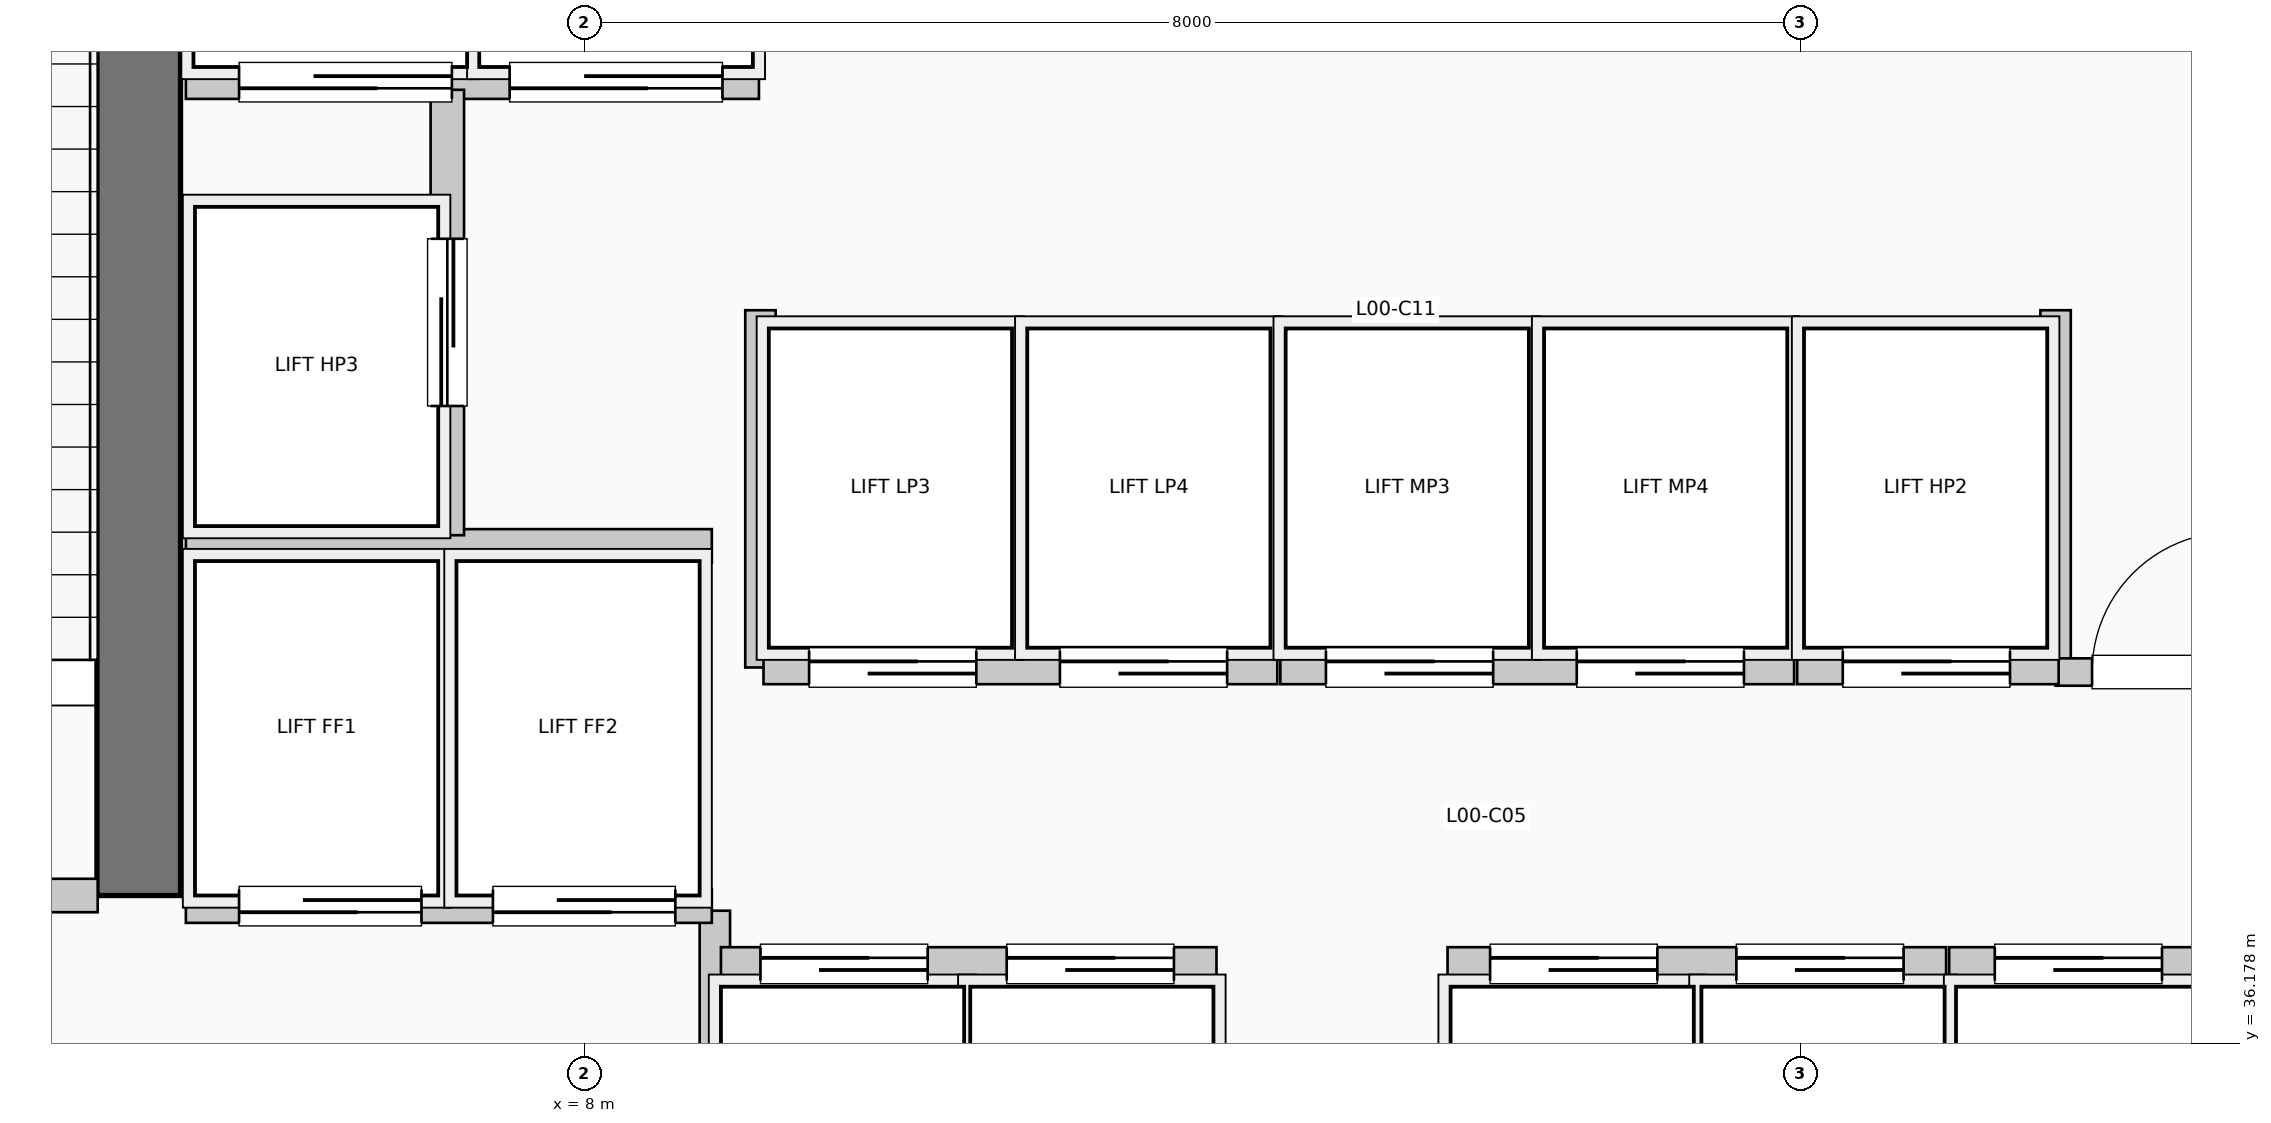
"""IFC4 building model, lengths in metres.
Left out: names, types, materials, properties, quantities, classifications, styles, units other than length and angle.
Written with IfcOpenShell. Run it as: python <this file> out.ifc"""

import sys

from ifc_helpers import new_model, si_unit, direction, frame, frame_2d, origin, place, context, subcontext, project, spatial, rectangle, extrude, element, fill, save


model = new_model("IFC4")
c1 = context("Model", 3, precision=1e-05, world=origin(), true_north=direction((0.0, 1.0)))
c2 = subcontext(c1, "Body", "Model", "MODEL_VIEW")
j1 = project(units=[si_unit("LENGTHUNIT", "METRE"), si_unit("PLANEANGLEUNIT", "RADIAN")], contexts=[c1])
p1 = place(None, origin())
s1 = spatial("IfcSite", under=j1, at=p1, CompositionType="ELEMENT")
p2 = place(p1, origin())
s2 = spatial("IfcBuilding", under=s1, at=p2, CompositionType="ELEMENT")
p3 = place(p2, origin())
s3 = spatial("IfcBuildingStorey", under=s2, at=p3, CompositionType="ELEMENT", Elevation=0.0)
p4 = place(p3, frame((5.07, 37.15, 0.0), z_axis=(0.0, 0.0, 1.0), x_axis=(0.0, 1.0, 0.0)))
e1 = element("IfcWall", 1, at=p4, inside=s3, PredefinedType="SHEAR", context=c2, shape_type="SweptSolid", body=[
    extrude(rectangle(XDim=7.89, YDim=0.55, at=frame_2d((3.945, 0.0))), origin(), (0.0, 0.0, 1.0), 5.94),
])
p5 = place(p3, frame((1.65, 37.15, 0.0), z_axis=(0.0, 0.0, 1.0), x_axis=(1.0, 0.0, 0.0)))
e2 = element("IfcWall", 2, at=p5, inside=s3, PredefinedType="PARTITIONING", context=c2, shape_type="SweptSolid", body=[
    extrude(rectangle(XDim=3.15, YDim=0.22, at=frame_2d((1.575, 0.0))), origin(), (0.0, 0.0, 1.0), 5.62),
])
p6 = place(p5, frame((2.05, 0.0, 0.0), z_axis=(0.0, 0.0, 1.0), x_axis=(-1.0, 0.0, 0.0)))
e3 = element("IfcOpeningElement", 3, at=p6, cuts=e2, PredefinedType="OPENING", context=c2, shape_type="SweptSolid", body=[
    extrude(rectangle(XDim=1.05, YDim=2.15, at=frame_2d((0.525, 1.075))), frame((0.0, 0.12, 0.0), z_axis=(0.0, -1.0, 0.0), x_axis=(1.0, 0.0, 0.0)), (0.0, 0.0, 1.0), 0.24),
])
p7 = place(p3, frame((8.86, 34.55, 0.0), z_axis=(0.0, 0.0, 1.0), x_axis=(0.0, 1.0, 0.0)))
e4 = element("IfcWall", 4, at=p7, inside=s3, PredefinedType="PARTITIONING", context=c2, shape_type="SweptSolid", body=[
    extrude(rectangle(XDim=2.5, YDim=0.2, at=frame_2d((1.25, 0.0))), origin(), (0.0, 0.0, 1.0), 5.62),
])
p8 = place(p3, frame((5.38, 37.08, 0.0), z_axis=(0.0, 0.0, 1.0), x_axis=(1.0, 0.0, 0.0)))
e5 = element("IfcWall", 5, at=p8, inside=s3, PredefinedType="PARTITIONING", context=c2, shape_type="SweptSolid", body=[
    extrude(rectangle(XDim=3.46, YDim=0.22, at=frame_2d((1.73, 0.0))), origin(), (0.0, 0.0, 1.0), 5.62),
])
p9 = place(p8, frame((1.55, 0.0, 0.0), z_axis=(0.0, 0.0, 1.0), x_axis=(-1.0, 0.0, 0.0)))
e6 = element("IfcOpeningElement", 6, at=p9, cuts=e5, PredefinedType="OPENING", context=c2, shape_type="SweptSolid", body=[
    extrude(rectangle(XDim=1.2, YDim=2.2, at=frame_2d((0.6, 1.1))), frame((0.0, 0.12, 0.0), z_axis=(0.0, -1.0, 0.0), x_axis=(1.0, 0.0, 0.0)), (0.0, 0.0, 1.0), 0.24),
])
p10 = place(p8, frame((3.22, 0.0, 0.0), z_axis=(0.0, 0.0, 1.0), x_axis=(-1.0, 0.0, 0.0)))
e7 = element("IfcOpeningElement", 7, at=p10, cuts=e5, PredefinedType="OPENING", context=c2, shape_type="SweptSolid", body=[
    extrude(rectangle(XDim=1.2, YDim=2.2, at=frame_2d((0.6, 1.1))), frame((0.0, 0.12, 0.0), z_axis=(0.0, -1.0, 0.0), x_axis=(1.0, 0.0, 0.0)), (0.0, 0.0, 1.0), 0.24),
])
p11 = place(p3, frame((5.38, 39.45, 0.0), z_axis=(0.0, 0.0, 1.0), x_axis=(1.0, 0.0, 0.0)))
e8 = element("IfcWall", 8, at=p11, inside=s3, PredefinedType="PARTITIONING", context=c2, shape_type="SweptSolid", body=[
    extrude(rectangle(XDim=3.46, YDim=0.22, at=frame_2d((1.73, 0.0))), origin(), (0.0, 0.0, 1.0), 5.62),
])
p12 = place(p3, frame((5.38, 42.5, 0.0), z_axis=(0.0, 0.0, 1.0), x_axis=(1.0, 0.0, 0.0)))
e9 = element("IfcWall", 9, at=p12, inside=s3, PredefinedType="PARTITIONING", context=c2, shape_type="SweptSolid", body=[
    extrude(rectangle(XDim=3.77, YDim=0.22, at=frame_2d((1.885, 0.0))), origin(), (0.0, 0.0, 1.0), 5.62),
])
p13 = place(p12, frame((1.75, 0.0, 0.0), z_axis=(0.0, 0.0, 1.0), x_axis=(-1.0, 0.0, 0.0)))
e10 = element("IfcOpeningElement", 10, at=p13, cuts=e9, PredefinedType="OPENING", context=c2, shape_type="SweptSolid", body=[
    extrude(rectangle(XDim=1.4, YDim=2.2, at=frame_2d((0.7, 1.1))), frame((0.0, 0.12, 0.0), z_axis=(0.0, -1.0, 0.0), x_axis=(1.0, 0.0, 0.0)), (0.0, 0.0, 1.0), 0.24),
])
p14 = place(p12, frame((3.53, 0.0, 0.0), z_axis=(0.0, 0.0, 1.0), x_axis=(-1.0, 0.0, 0.0)))
e11 = element("IfcOpeningElement", 11, at=p14, cuts=e9, PredefinedType="OPENING", context=c2, shape_type="SweptSolid", body=[
    extrude(rectangle(XDim=1.4, YDim=2.2, at=frame_2d((0.7, 1.1))), frame((0.0, 0.12, 0.0), z_axis=(0.0, -1.0, 0.0), x_axis=(1.0, 0.0, 0.0)), (0.0, 0.0, 1.0), 0.24),
])
p15 = place(p3, frame((7.1, 39.52, 0.0), z_axis=(0.0, 0.0, 1.0), x_axis=(0.0, 1.0, 0.0)))
e12 = element("IfcWall", 12, at=p15, inside=s3, PredefinedType="PARTITIONING", context=c2, shape_type="SweptSolid", body=[
    extrude(rectangle(XDim=2.93, YDim=0.22, at=frame_2d((1.465, 0.0))), origin(), (0.0, 0.0, 1.0), 5.62),
])
p16 = place(p15, frame((0.85, 0.0, 0.0)))
e13 = element("IfcOpeningElement", 13, at=p16, cuts=e12, PredefinedType="OPENING", context=c2, shape_type="SweptSolid", body=[
    extrude(rectangle(XDim=1.1, YDim=2.2, at=frame_2d((0.55, 1.1))), frame((0.0, 0.12, 0.0), z_axis=(0.0, -1.0, 0.0), x_axis=(1.0, 0.0, 0.0)), (0.0, 0.0, 1.0), 0.24),
])
for number, where, z_axis, x_axis in (
    (14, (9.16, 38.65, 0.0), (0.0, 0.0, 1.0), (0.0, 1.0, 0.0)),
    (15, (17.68, 38.65, 0.0), (0.0, 0.0, 1.0), (0.0, 1.0, 0.0)),
):
    element("IfcWall", number, at=place(p3, frame(where, z_axis=z_axis, x_axis=x_axis)), inside=s3, PredefinedType="PARTITIONING", context=c2, shape_type="SweptSolid", body=[
        extrude(rectangle(XDim=2.35, YDim=0.2, at=frame_2d((1.175, 0.0))), origin(), (0.0, 0.0, 1.0), 5.62),
    ])
p17 = place(p3, frame((17.68, 38.62, 0.0), z_axis=(0.0, 0.0, 1.0), x_axis=(1.0, 0.0, 0.0)))
e16 = element("IfcWall", 16, at=p17, inside=s3, PredefinedType="PARTITIONING", context=c2, shape_type="SweptSolid", body=[
    extrude(rectangle(XDim=1.84, YDim=0.18, at=frame_2d((0.92, 0.0))), origin(), (0.0, 0.0, 1.0), 5.62),
])
p18 = place(p17, frame((0.24, 0.0, 0.0)))
e17 = element("IfcOpeningElement", 17, at=p18, cuts=e16, PredefinedType="OPENING", context=c2, shape_type="SweptSolid", body=[
    extrude(rectangle(XDim=0.92, YDim=2.1, at=frame_2d((0.46, 1.05))), frame((0.0, 0.1, 0.0), z_axis=(0.0, -1.0, 0.0), x_axis=(1.0, 0.0, 0.0)), (0.0, 0.0, 1.0), 0.2),
])
p19 = place(p3, frame((8.9, 36.7, 0.0), z_axis=(0.0, 0.0, 1.0), x_axis=(1.0, 0.0, 0.0)))
e18 = element("IfcWall", 18, at=p19, inside=s3, PredefinedType="PARTITIONING", context=c2, shape_type="SweptSolid", body=[
    extrude(rectangle(XDim=3.26, YDim=0.22, at=frame_2d((1.63, 0.0))), origin(), (0.0, 0.0, 1.0), 5.62),
])
p20 = place(p19, frame((0.26, 0.0, 0.0)))
e19 = element("IfcOpeningElement", 19, at=p20, cuts=e18, PredefinedType="OPENING", context=c2, shape_type="SweptSolid", body=[
    extrude(rectangle(XDim=1.1, YDim=2.2, at=frame_2d((0.55, 1.1))), frame((0.0, 0.12, 0.0), z_axis=(0.0, -1.0, 0.0), x_axis=(1.0, 0.0, 0.0)), (0.0, 0.0, 1.0), 0.24),
])
p21 = place(p19, frame((1.88, 0.0, 0.0)))
e20 = element("IfcOpeningElement", 20, at=p21, cuts=e18, PredefinedType="OPENING", context=c2, shape_type="SweptSolid", body=[
    extrude(rectangle(XDim=1.1, YDim=2.2, at=frame_2d((0.55, 1.1))), frame((0.0, 0.12, 0.0), z_axis=(0.0, -1.0, 0.0), x_axis=(1.0, 0.0, 0.0)), (0.0, 0.0, 1.0), 0.24),
])
p22 = place(p3, frame((9.18, 38.65, 0.0), z_axis=(0.0, 0.0, 1.0), x_axis=(1.0, 0.0, 0.0)))
e21 = element("IfcWall", 21, at=p22, inside=s3, PredefinedType="PARTITIONING", context=c2, shape_type="SweptSolid", body=[
    extrude(rectangle(XDim=3.38, YDim=0.22, at=frame_2d((1.69, 0.0))), origin(), (0.0, 0.0, 1.0), 5.62),
])
p23 = place(p22, frame((0.3, 0.0, 0.0)))
e22 = element("IfcOpeningElement", 22, at=p23, cuts=e21, PredefinedType="OPENING", context=c2, shape_type="SweptSolid", body=[
    extrude(rectangle(XDim=1.1, YDim=2.2, at=frame_2d((0.55, 1.1))), frame((0.0, 0.12, 0.0), z_axis=(0.0, -1.0, 0.0), x_axis=(1.0, 0.0, 0.0)), (0.0, 0.0, 1.0), 0.24),
])
p24 = place(p22, frame((1.95, 0.0, 0.0)))
e23 = element("IfcOpeningElement", 23, at=p24, cuts=e21, PredefinedType="OPENING", context=c2, shape_type="SweptSolid", body=[
    extrude(rectangle(XDim=1.1, YDim=2.2, at=frame_2d((0.55, 1.1))), frame((0.0, 0.12, 0.0), z_axis=(0.0, -1.0, 0.0), x_axis=(1.0, 0.0, 0.0)), (0.0, 0.0, 1.0), 0.24),
])
p25 = place(p3, frame((13.68, 36.7, 0.0), z_axis=(0.0, 0.0, 1.0), x_axis=(1.0, 0.0, 0.0)))
e24 = element("IfcWall", 24, at=p25, inside=s3, PredefinedType="PARTITIONING", context=c2, shape_type="SweptSolid", body=[
    extrude(rectangle(XDim=3.28, YDim=0.22, at=frame_2d((1.64, 0.0))), origin(), (0.0, 0.0, 1.0), 5.62),
])
p26 = place(p25, frame((0.28, 0.0, 0.0)))
e25 = element("IfcOpeningElement", 25, at=p26, cuts=e24, PredefinedType="OPENING", context=c2, shape_type="SweptSolid", body=[
    extrude(rectangle(XDim=1.1, YDim=2.2, at=frame_2d((0.55, 1.1))), frame((0.0, 0.12, 0.0), z_axis=(0.0, -1.0, 0.0), x_axis=(1.0, 0.0, 0.0)), (0.0, 0.0, 1.0), 0.24),
])
p27 = place(p25, frame((1.9, 0.0, 0.0)))
e26 = element("IfcOpeningElement", 26, at=p27, cuts=e24, PredefinedType="OPENING", context=c2, shape_type="SweptSolid", body=[
    extrude(rectangle(XDim=1.1, YDim=2.2, at=frame_2d((0.55, 1.1))), frame((0.0, 0.12, 0.0), z_axis=(0.0, -1.0, 0.0), x_axis=(1.0, 0.0, 0.0)), (0.0, 0.0, 1.0), 0.24),
])
p28 = place(p3, frame((12.58, 38.65, 0.0), z_axis=(0.0, 0.0, 1.0), x_axis=(1.0, 0.0, 0.0)))
e27 = element("IfcWall", 27, at=p28, inside=s3, PredefinedType="PARTITIONING", context=c2, shape_type="SweptSolid", body=[
    extrude(rectangle(XDim=3.38, YDim=0.22, at=frame_2d((1.69, 0.0))), origin(), (0.0, 0.0, 1.0), 5.62),
])
p29 = place(p28, frame((0.3, 0.0, 0.0)))
e28 = element("IfcOpeningElement", 28, at=p29, cuts=e27, PredefinedType="OPENING", context=c2, shape_type="SweptSolid", body=[
    extrude(rectangle(XDim=1.1, YDim=2.2, at=frame_2d((0.55, 1.1))), frame((0.0, 0.12, 0.0), z_axis=(0.0, -1.0, 0.0), x_axis=(1.0, 0.0, 0.0)), (0.0, 0.0, 1.0), 0.24),
])
p30 = place(p28, frame((1.95, 0.0, 0.0)))
e29 = element("IfcOpeningElement", 29, at=p30, cuts=e27, PredefinedType="OPENING", context=c2, shape_type="SweptSolid", body=[
    extrude(rectangle(XDim=1.1, YDim=2.2, at=frame_2d((0.55, 1.1))), frame((0.0, 0.12, 0.0), z_axis=(0.0, -1.0, 0.0), x_axis=(1.0, 0.0, 0.0)), (0.0, 0.0, 1.0), 0.24),
])
p31 = place(p3, frame((16.98, 36.7, 0.0), z_axis=(0.0, 0.0, 1.0), x_axis=(1.0, 0.0, 0.0)))
e30 = element("IfcWall", 30, at=p31, inside=s3, PredefinedType="PARTITIONING", context=c2, shape_type="SweptSolid", body=[
    extrude(rectangle(XDim=1.7, YDim=0.22, at=frame_2d((0.85, 0.0))), origin(), (0.0, 0.0, 1.0), 5.62),
])
p32 = place(p31, frame((0.3, 0.0, 0.0)))
e31 = element("IfcOpeningElement", 31, at=p32, cuts=e30, PredefinedType="OPENING", context=c2, shape_type="SweptSolid", body=[
    extrude(rectangle(XDim=1.1, YDim=2.2, at=frame_2d((0.55, 1.1))), frame((0.0, 0.12, 0.0), z_axis=(0.0, -1.0, 0.0), x_axis=(1.0, 0.0, 0.0)), (0.0, 0.0, 1.0), 0.24),
])
p33 = place(p3, frame((15.98, 38.65, 0.0), z_axis=(0.0, 0.0, 1.0), x_axis=(1.0, 0.0, 0.0)))
e32 = element("IfcWall", 32, at=p33, inside=s3, PredefinedType="PARTITIONING", context=c2, shape_type="SweptSolid", body=[
    extrude(rectangle(XDim=1.72, YDim=0.22, at=frame_2d((0.86, 0.0))), origin(), (0.0, 0.0, 1.0), 5.62),
])
p34 = place(p33, frame((0.3, 0.0, 0.0)))
e33 = element("IfcOpeningElement", 33, at=p34, cuts=e32, PredefinedType="OPENING", context=c2, shape_type="SweptSolid", body=[
    extrude(rectangle(XDim=1.1, YDim=2.2, at=frame_2d((0.55, 1.1))), frame((0.0, 0.12, 0.0), z_axis=(0.0, -1.0, 0.0), x_axis=(1.0, 0.0, 0.0)), (0.0, 0.0, 1.0), 0.24),
])
p35 = place(p9, origin())
e34 = element("IfcDoor", 34, at=p35, inside=s3, OperationType="SLIDING_TO_RIGHT", PredefinedType="DOOR", context=c2, shape_type="SweptSolid", body=[
    extrude(rectangle(XDim=1.2, YDim=2.2, at=frame_2d((0.6, 1.1))), frame((0.0, 0.025, 0.0), z_axis=(0.0, -1.0, 0.0), x_axis=(1.0, 0.0, 0.0)), (0.0, 0.0, 1.0), 0.05),
])
fill(e6, e34)
p36 = place(p10, origin())
e35 = element("IfcDoor", 35, at=p36, inside=s3, OperationType="SLIDING_TO_RIGHT", PredefinedType="DOOR", context=c2, shape_type="SweptSolid", body=[
    extrude(rectangle(XDim=1.2, YDim=2.2, at=frame_2d((0.6, 1.1))), frame((0.0, 0.025, 0.0), z_axis=(0.0, -1.0, 0.0), x_axis=(1.0, 0.0, 0.0)), (0.0, 0.0, 1.0), 0.05),
])
fill(e7, e35)
p37 = place(p13, origin())
e36 = element("IfcDoor", 36, at=p37, inside=s3, OperationType="SLIDING_TO_LEFT", PredefinedType="DOOR", context=c2, shape_type="SweptSolid", body=[
    extrude(rectangle(XDim=1.4, YDim=2.2, at=frame_2d((0.7, 1.1))), frame((0.0, 0.025, 0.0), z_axis=(0.0, -1.0, 0.0), x_axis=(1.0, 0.0, 0.0)), (0.0, 0.0, 1.0), 0.05),
])
fill(e10, e36)
p38 = place(p14, origin())
e37 = element("IfcDoor", 37, at=p38, inside=s3, OperationType="SLIDING_TO_LEFT", PredefinedType="DOOR", context=c2, shape_type="SweptSolid", body=[
    extrude(rectangle(XDim=1.4, YDim=2.2, at=frame_2d((0.7, 1.1))), frame((0.0, 0.025, 0.0), z_axis=(0.0, -1.0, 0.0), x_axis=(1.0, 0.0, 0.0)), (0.0, 0.0, 1.0), 0.05),
])
fill(e11, e37)
p39 = place(p16, origin())
e38 = element("IfcDoor", 38, at=p39, inside=s3, OperationType="SLIDING_TO_LEFT", PredefinedType="DOOR", context=c2, shape_type="SweptSolid", body=[
    extrude(rectangle(XDim=1.1, YDim=2.2, at=frame_2d((0.55, 1.1))), frame((0.0, 0.025, 0.0), z_axis=(0.0, -1.0, 0.0), x_axis=(1.0, 0.0, 0.0)), (0.0, 0.0, 1.0), 0.05),
])
fill(e13, e38)
p40 = place(p18, origin())
e39 = element("IfcDoor", 39, at=p40, inside=s3, OperationType="SINGLE_SWING_RIGHT", PredefinedType="DOOR", context=c2, shape_type="SweptSolid", body=[
    extrude(rectangle(XDim=0.92, YDim=2.1, at=frame_2d((0.46, 1.05))), frame((0.0, 0.025, 0.0), z_axis=(0.0, -1.0, 0.0), x_axis=(1.0, 0.0, 0.0)), (0.0, 0.0, 1.0), 0.05),
])
fill(e17, e39)
p41 = place(p20, origin())
e40 = element("IfcDoor", 40, at=p41, inside=s3, OperationType="SLIDING_TO_LEFT", PredefinedType="DOOR", context=c2, shape_type="SweptSolid", body=[
    extrude(rectangle(XDim=1.1, YDim=2.2, at=frame_2d((0.55, 1.1))), frame((0.0, 0.025, 0.0), z_axis=(0.0, -1.0, 0.0), x_axis=(1.0, 0.0, 0.0)), (0.0, 0.0, 1.0), 0.05),
])
fill(e19, e40)
p42 = place(p21, origin())
e41 = element("IfcDoor", 41, at=p42, inside=s3, OperationType="SLIDING_TO_LEFT", PredefinedType="DOOR", context=c2, shape_type="SweptSolid", body=[
    extrude(rectangle(XDim=1.1, YDim=2.2, at=frame_2d((0.55, 1.1))), frame((0.0, 0.025, 0.0), z_axis=(0.0, -1.0, 0.0), x_axis=(1.0, 0.0, 0.0)), (0.0, 0.0, 1.0), 0.05),
])
fill(e20, e41)
p43 = place(p23, origin())
e42 = element("IfcDoor", 42, at=p43, inside=s3, OperationType="SLIDING_TO_LEFT", PredefinedType="DOOR", context=c2, shape_type="SweptSolid", body=[
    extrude(rectangle(XDim=1.1, YDim=2.2, at=frame_2d((0.55, 1.1))), frame((0.0, 0.025, 0.0), z_axis=(0.0, -1.0, 0.0), x_axis=(1.0, 0.0, 0.0)), (0.0, 0.0, 1.0), 0.05),
])
fill(e22, e42)
p44 = place(p24, origin())
e43 = element("IfcDoor", 43, at=p44, inside=s3, OperationType="SLIDING_TO_LEFT", PredefinedType="DOOR", context=c2, shape_type="SweptSolid", body=[
    extrude(rectangle(XDim=1.1, YDim=2.2, at=frame_2d((0.55, 1.1))), frame((0.0, 0.025, 0.0), z_axis=(0.0, -1.0, 0.0), x_axis=(1.0, 0.0, 0.0)), (0.0, 0.0, 1.0), 0.05),
])
fill(e23, e43)
p45 = place(p26, origin())
e44 = element("IfcDoor", 44, at=p45, inside=s3, OperationType="SLIDING_TO_RIGHT", PredefinedType="DOOR", context=c2, shape_type="SweptSolid", body=[
    extrude(rectangle(XDim=1.1, YDim=2.2, at=frame_2d((0.55, 1.1))), frame((0.0, 0.025, 0.0), z_axis=(0.0, -1.0, 0.0), x_axis=(1.0, 0.0, 0.0)), (0.0, 0.0, 1.0), 0.05),
])
fill(e25, e44)
p46 = place(p27, origin())
e45 = element("IfcDoor", 45, at=p46, inside=s3, OperationType="SLIDING_TO_RIGHT", PredefinedType="DOOR", context=c2, shape_type="SweptSolid", body=[
    extrude(rectangle(XDim=1.1, YDim=2.2, at=frame_2d((0.55, 1.1))), frame((0.0, 0.025, 0.0), z_axis=(0.0, -1.0, 0.0), x_axis=(1.0, 0.0, 0.0)), (0.0, 0.0, 1.0), 0.05),
])
fill(e26, e45)
p47 = place(p29, origin())
e46 = element("IfcDoor", 46, at=p47, inside=s3, OperationType="SLIDING_TO_RIGHT", PredefinedType="DOOR", context=c2, shape_type="SweptSolid", body=[
    extrude(rectangle(XDim=1.1, YDim=2.2, at=frame_2d((0.55, 1.1))), frame((0.0, 0.025, 0.0), z_axis=(0.0, -1.0, 0.0), x_axis=(1.0, 0.0, 0.0)), (0.0, 0.0, 1.0), 0.05),
])
fill(e28, e46)
p48 = place(p30, origin())
e47 = element("IfcDoor", 47, at=p48, inside=s3, OperationType="SLIDING_TO_RIGHT", PredefinedType="DOOR", context=c2, shape_type="SweptSolid", body=[
    extrude(rectangle(XDim=1.1, YDim=2.2, at=frame_2d((0.55, 1.1))), frame((0.0, 0.025, 0.0), z_axis=(0.0, -1.0, 0.0), x_axis=(1.0, 0.0, 0.0)), (0.0, 0.0, 1.0), 0.05),
])
fill(e29, e47)
p49 = place(p32, origin())
e48 = element("IfcDoor", 48, at=p49, inside=s3, OperationType="SLIDING_TO_LEFT", PredefinedType="DOOR", context=c2, shape_type="SweptSolid", body=[
    extrude(rectangle(XDim=1.1, YDim=2.2, at=frame_2d((0.55, 1.1))), frame((0.0, 0.025, 0.0), z_axis=(0.0, -1.0, 0.0), x_axis=(1.0, 0.0, 0.0)), (0.0, 0.0, 1.0), 0.05),
])
fill(e31, e48)
p50 = place(p34, origin())
e49 = element("IfcDoor", 49, at=p50, inside=s3, OperationType="SLIDING_TO_LEFT", PredefinedType="DOOR", context=c2, shape_type="SweptSolid", body=[
    extrude(rectangle(XDim=1.1, YDim=2.2, at=frame_2d((0.55, 1.1))), frame((0.0, 0.025, 0.0), z_axis=(0.0, -1.0, 0.0), x_axis=(1.0, 0.0, 0.0)), (0.0, 0.0, 1.0), 0.05),
])
fill(e33, e49)
save(model, sys.argv[1])
